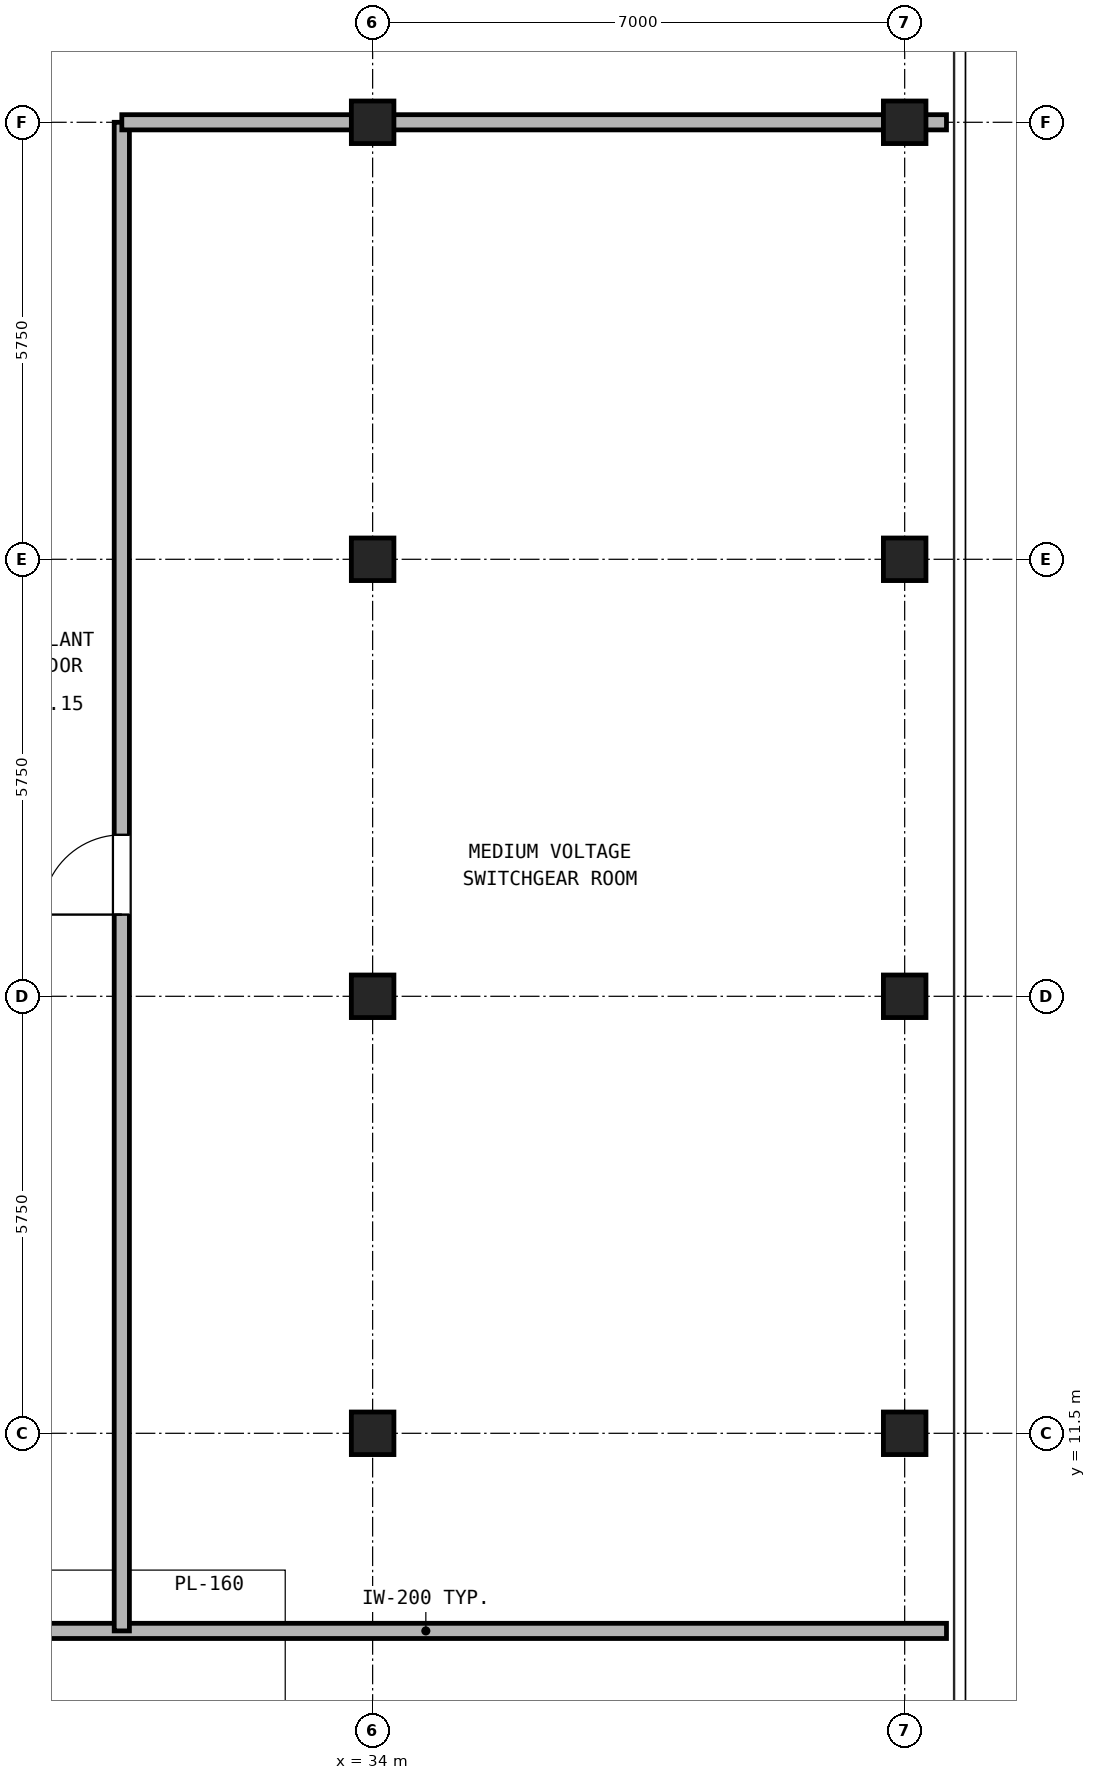
"""IFC4 building model, lengths in metres.
Left out: names, types, materials, properties, quantities, classifications, styles, units other than length and angle.
Written with IfcOpenShell. Run it as: python <this file> out.ifc"""

import sys

from ifc_helpers import new_model, si_unit, direction, frame, frame_2d, origin, origin_2d, place, context, subcontext, project, spatial, rectangle, hollow_rectangle, extrude, source, transform, mapped, element, fill, save


model = new_model("IFC4")
c1 = context("Model", 3, precision=1e-05, world=origin(), true_north=direction((0.0, 1.0)))
c2 = subcontext(c1, "Body", "Model", "MODEL_VIEW")
j1 = project(units=[si_unit("LENGTHUNIT", "METRE"), si_unit("PLANEANGLEUNIT", "RADIAN")], contexts=[c1])
p1 = place(None, origin())
s1 = spatial("IfcSite", under=j1, at=p1, CompositionType="ELEMENT")
p2 = place(p1, origin())
s2 = spatial("IfcBuilding", under=s1, at=p2, CompositionType="ELEMENT")
p3 = place(p2, frame((0.0, 0.0, 271.3)))
s3 = spatial("IfcBuildingStorey", under=s2, at=p3, CompositionType="ELEMENT", Elevation=271.3)
m1 = source(origin(), c2, "Body", "SweptSolid", [
    extrude(hollow_rectangle(XDim=0.56, YDim=0.56, WallThickness=0.03, at=origin_2d()), origin(), (0.0, 0.0, 1.0), 3.38),
])
for number, where, z_axis, x_axis in (
    (1, (41.0, 11.5, 0.0), (0.0, 0.0, 1.0), (1.0, 0.0, 0.0)),
    (2, (41.0, 17.25, 0.0), (0.0, 0.0, 1.0), (1.0, 0.0, 0.0)),
    (3, (41.0, 23.0, 0.0), (0.0, 0.0, 1.0), (1.0, 0.0, 0.0)),
    (4, (41.0, 28.75, 0.0), (0.0, 0.0, 1.0), (1.0, 0.0, 0.0)),
    (5, (34.0, 11.5, 0.0), (0.0, 0.0, 1.0), (1.0, 0.0, 0.0)),
    (6, (34.0, 17.25, 0.0), (0.0, 0.0, 1.0), (1.0, 0.0, 0.0)),
    (7, (34.0, 23.0, 0.0), (0.0, 0.0, 1.0), (1.0, 0.0, 0.0)),
    (8, (34.0, 28.75, 0.0), (0.0, 0.0, 1.0), (1.0, 0.0, 0.0)),
):
    element("IfcColumn", number, at=place(p3, frame(where, z_axis=z_axis, x_axis=x_axis)), inside=s3, PredefinedType="COLUMN", context=c2, shape_type="MappedRepresentation", body=[
        mapped(m1, transform((0.0, 0.0, 0.0), x_axis=(1.0, 0.0, 0.0), y_axis=(0.0, 1.0, 0.0), z_axis=(0.0, 0.0, 1.0), scale=1.0)),
    ])
p4 = place(p3, frame((5.45, 8.9, 0.0), z_axis=(0.0, 0.0, 1.0), x_axis=(1.0, 0.0, 0.0)))
e9 = element("IfcWall", 9, at=p4, inside=s3, PredefinedType="PARTITIONING", context=c2, shape_type="SweptSolid", body=[
    extrude(rectangle(XDim=36.1, YDim=0.2, at=frame_2d((18.05, 0.0))), origin(), (0.0, 0.0, 1.0), 3.38),
])
p5 = place(p4, frame((13.45, 0.0, 0.0)))
e10 = element("IfcOpeningElement", 10, at=p5, cuts=e9, PredefinedType="OPENING", context=c2, shape_type="SweptSolid", body=[
    extrude(rectangle(XDim=1.5, YDim=2.25, at=frame_2d((0.75, 1.125))), frame((0.0, 0.11, 0.0), z_axis=(0.0, -1.0, 0.0), x_axis=(1.0, 0.0, 0.0)), (0.0, 0.0, 1.0), 0.22),
])
p6 = place(p4, frame((20.65, 0.0, 0.0)))
e11 = element("IfcOpeningElement", 11, at=p6, cuts=e9, PredefinedType="OPENING", context=c2, shape_type="SweptSolid", body=[
    extrude(rectangle(XDim=1.5, YDim=2.25, at=frame_2d((0.75, 1.125))), frame((0.0, 0.11, 0.0), z_axis=(0.0, -1.0, 0.0), x_axis=(1.0, 0.0, 0.0)), (0.0, 0.0, 1.0), 0.22),
])
p7 = place(p3, frame((30.7, 8.9, 0.0), z_axis=(0.0, 0.0, 1.0), x_axis=(0.0, 1.0, 0.0)))
e12 = element("IfcWall", 12, at=p7, inside=s3, PredefinedType="PARTITIONING", context=c2, shape_type="SweptSolid", body=[
    extrude(rectangle(XDim=19.85, YDim=0.2, at=frame_2d((9.925, 0.0))), origin(), (0.0, 0.0, 1.0), 3.38),
])
p8 = place(p7, frame((9.425, 0.0, 0.0)))
e13 = element("IfcOpeningElement", 13, at=p8, cuts=e12, PredefinedType="OPENING", context=c2, shape_type="SweptSolid", body=[
    extrude(rectangle(XDim=1.05, YDim=2.15, at=frame_2d((0.525, 1.075))), frame((0.0, 0.11, 0.0), z_axis=(0.0, -1.0, 0.0), x_axis=(1.0, 0.0, 0.0)), (0.0, 0.0, 1.0), 0.22),
])
p9 = place(p3, frame((30.7, 28.75, 0.0), z_axis=(0.0, 0.0, 1.0), x_axis=(1.0, 0.0, 0.0)))
e14 = element("IfcWall", 14, at=p9, inside=s3, PredefinedType="PARTITIONING", context=c2, shape_type="SweptSolid", body=[
    extrude(rectangle(XDim=10.85, YDim=0.2, at=frame_2d((5.425, 0.0))), origin(), (0.0, 0.0, 1.0), 2.905),
])
p10 = place(p8, origin())
e15 = element("IfcDoor", 15, at=p10, inside=s3, OperationType="SINGLE_SWING_LEFT", PredefinedType="DOOR", context=c2, shape_type="SweptSolid", body=[
    extrude(rectangle(XDim=1.05, YDim=2.15, at=frame_2d((0.525, 1.075))), frame((0.0, 0.025, 0.0), z_axis=(0.0, -1.0, 0.0), x_axis=(1.0, 0.0, 0.0)), (0.0, 0.0, 1.0), 0.05),
])
fill(e13, e15)
save(model, sys.argv[1])
